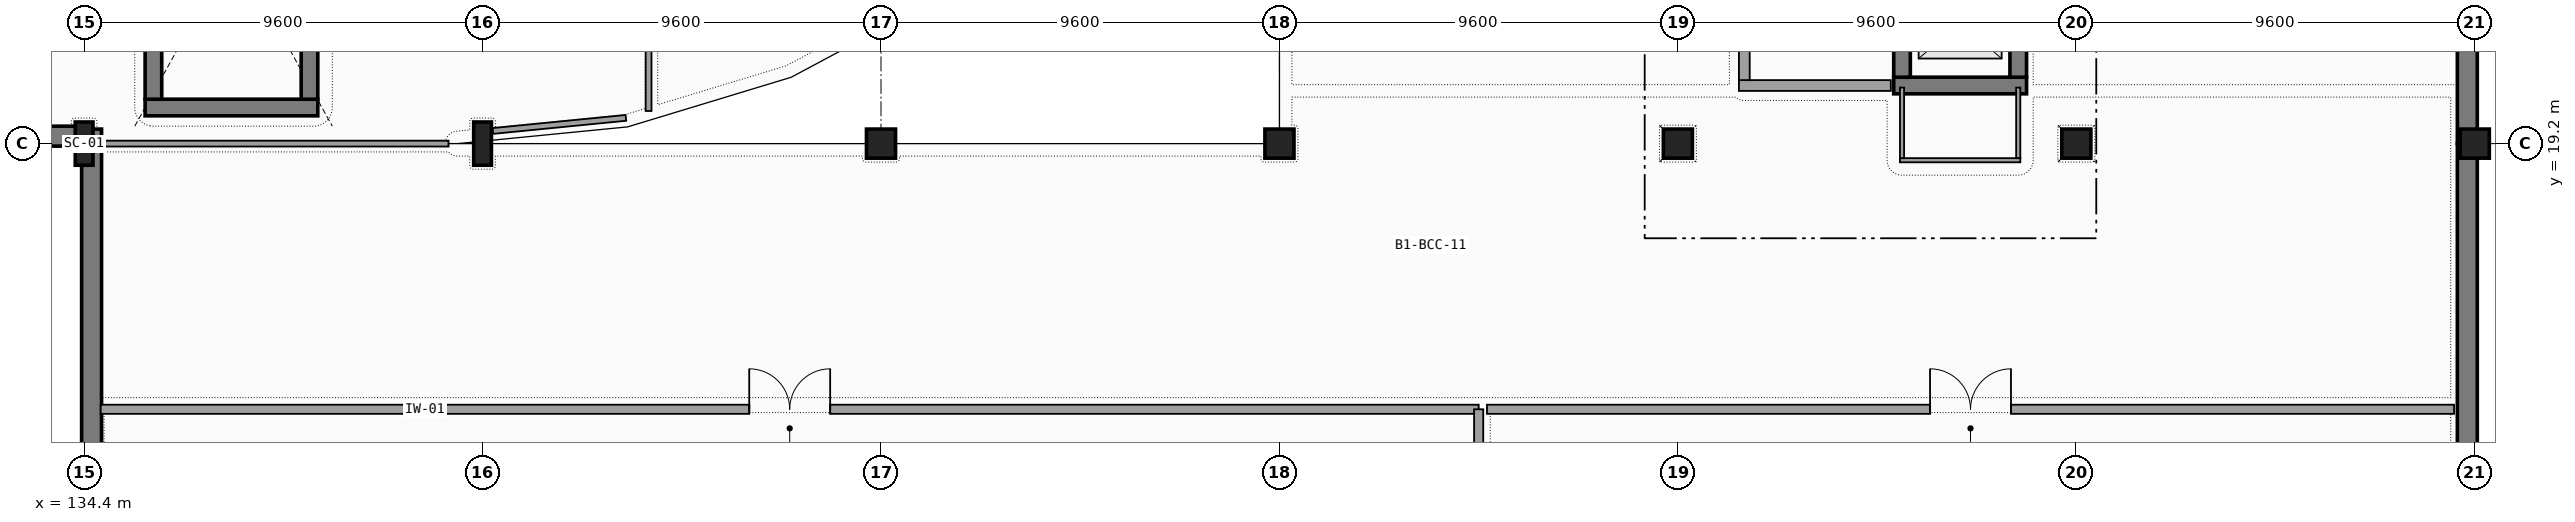
"""IFC4 building model, lengths in metres.
Left out: names, types, materials, properties, quantities, classifications, styles, units other than length and angle.
Written with IfcOpenShell. Run it as: python <this file> out.ifc"""

import sys

from ifc_helpers import new_model, si_unit, direction, frame, frame_2d, origin, origin_2d, place, context, subcontext, project, spatial, rectangle, i_section, extrude, element, fill, save


model = new_model("IFC4")
c1 = context("Model", 3, precision=1e-05, world=origin(), true_north=direction((0.0, 1.0)))
c2 = subcontext(c1, "Body", "Model", "MODEL_VIEW")
j1 = project(units=[si_unit("LENGTHUNIT", "METRE"), si_unit("PLANEANGLEUNIT", "RADIAN")], contexts=[c1])
p1 = place(None, origin())
s1 = spatial("IfcSite", under=j1, at=p1, CompositionType="ELEMENT")
p2 = place(p1, origin())
s2 = spatial("IfcBuilding", under=s1, at=p2, CompositionType="ELEMENT")
p3 = place(p2, frame((0.0, 0.0, -4.8)))
s3 = spatial("IfcBuildingStorey", under=s2, at=p3, CompositionType="ELEMENT", Elevation=-4.8)
for number, where, z_axis, x_axis in (
    (1, (134.4, 19.2, 0.0), (0.0, 0.0, 1.0), (1.0, 0.0, 0.0)),
    (2, (144.0, 19.2, 0.0), (0.0, 0.0, 1.0), (1.0, 0.0, 0.0)),
):
    element("IfcColumn", number, at=place(p3, frame(where, z_axis=z_axis, x_axis=x_axis)), inside=s3, PredefinedType="COLUMN", context=c2, shape_type="SweptSolid", body=[
        extrude(i_section(OverallWidth=0.427, OverallDepth=1.042, WebThickness=0.031, FlangeThickness=0.056, FilletRadius=0.031, at=origin_2d()), origin(), (0.0, 0.0, 1.0), 4.8),
    ])
for number, where, z_axis, x_axis in (
    (3, (153.6, 19.2, 0.0), (0.0, 0.0, 1.0), (1.0, 0.0, 0.0)),
    (4, (163.2, 19.2, 0.0), (0.0, 0.0, 1.0), (1.0, 0.0, 0.0)),
    (5, (172.8, 19.2, 0.0), (0.0, 0.0, 1.0), (1.0, 0.0, 0.0)),
    (6, (182.4, 19.2, 0.0), (0.0, 0.0, 1.0), (1.0, 0.0, 0.0)),
    (7, (192.0, 19.2, 0.0), (0.0, 0.0, 1.0), (1.0, 0.0, 0.0)),
):
    element("IfcColumn", number, at=place(p3, frame(where, z_axis=z_axis, x_axis=x_axis)), inside=s3, PredefinedType="COLUMN", context=c2, shape_type="SweptSolid", body=[
        extrude(rectangle(XDim=0.7, YDim=0.7, at=origin_2d()), origin(), (0.0, 0.0, 1.0), 4.8),
    ])
p4 = place(p3, frame((124.8, 19.38, 0.0), z_axis=(0.0, 0.0, 1.0), x_axis=(1.0, 0.0, 0.0)))
e8 = element("IfcWall", 8, at=p4, inside=s3, PredefinedType="USERDEFINED", context=c2, shape_type="SweptSolid", body=[
    extrude(rectangle(XDim=9.6, YDim=0.48, at=frame_2d((4.8, 0.0))), origin(), (0.0, 0.0, 1.0), 3.573),
])
p5 = place(p3, frame((134.58, 19.55, 0.0), z_axis=(0.0, 0.0, 1.0), x_axis=(0.0, -1.0, 0.0)))
e9 = element("IfcWall", 9, at=p5, inside=s3, PredefinedType="USERDEFINED", context=c2, shape_type="SweptSolid", body=[
    extrude(rectangle(XDim=9.95, YDim=0.48, at=frame_2d((4.975, 0.0))), origin(), (0.0, 0.0, 1.0), 3.573),
])
p6 = place(p3, frame((191.82, 9.6, 0.0), z_axis=(0.0, 0.0, 1.0), x_axis=(0.0, 1.0, 0.0)))
e10 = element("IfcWall", 10, at=p6, inside=s3, PredefinedType="USERDEFINED", context=c2, shape_type="SweptSolid", body=[
    extrude(rectangle(XDim=9.6, YDim=0.48, at=frame_2d((4.8, 0.0))), origin(), (0.0, 0.0, 1.0), 3.6),
])
p7 = place(p3, frame((191.82, 19.2, 0.0), z_axis=(0.0, 0.0, 1.0), x_axis=(0.0, 1.0, 0.0)))
e11 = element("IfcWall", 11, at=p7, inside=s3, PredefinedType="USERDEFINED", context=c2, shape_type="SweptSolid", body=[
    extrude(rectangle(XDim=9.6, YDim=0.48, at=frame_2d((4.8, 0.0))), origin(), (0.0, 0.0, 1.0), 3.573),
])
p8 = place(p3, frame((178.0, 20.6, 0.0), z_axis=(0.0, 0.0, 1.0), x_axis=(1.0, 0.0, 0.0)))
e12 = element("IfcWall", 12, at=p8, inside=s3, PredefinedType="SHEAR", context=c2, shape_type="SweptSolid", body=[
    extrude(rectangle(XDim=3.2, YDim=0.4, at=frame_2d((1.6, 0.0))), origin(), (0.0, 0.0, 1.0), 4.5),
])
p9 = place(p3, frame((178.2, 23.4, 0.0), z_axis=(0.0, 0.0, 1.0), x_axis=(0.0, -1.0, 0.0)))
e13 = element("IfcWall", 13, at=p9, inside=s3, PredefinedType="SHEAR", context=c2, shape_type="SweptSolid", body=[
    extrude(rectangle(XDim=2.6, YDim=0.4, at=frame_2d((1.3, 0.0))), origin(), (0.0, 0.0, 1.0), 4.5),
])
p10 = place(p9, frame((0.725, 0.0, 0.0), z_axis=(0.0, 0.0, 1.0), x_axis=(1.0, 0.0, 0.0)))
e14 = element("IfcOpeningElement", 14, at=p10, cuts=e13, PredefinedType="OPENING", context=c2, shape_type="SweptSolid", body=[
    extrude(rectangle(XDim=1.15, YDim=2.2, at=frame_2d((0.575, 1.1))), frame((0.0, 0.21, 0.0), z_axis=(0.0, -1.0, 0.0), x_axis=(1.0, 0.0, 0.0)), (0.0, 0.0, 1.0), 0.42),
])
p11 = place(p3, frame((181.0, 20.8, 0.0), z_axis=(0.0, 0.0, 1.0), x_axis=(0.0, 1.0, 0.0)))
e15 = element("IfcWall", 15, at=p11, inside=s3, PredefinedType="SHEAR", context=c2, shape_type="SweptSolid", body=[
    extrude(rectangle(XDim=2.6, YDim=0.4, at=frame_2d((1.3, 0.0))), origin(), (0.0, 0.0, 1.0), 4.5),
])
p12 = place(p3, frame((178.15, 18.8, 0.0), z_axis=(0.0, 0.0, 1.0), x_axis=(1.0, 0.0, 0.0)))
e16 = element("IfcWall", 16, at=p12, inside=s3, PredefinedType="PARTITIONING", context=c2, shape_type="SweptSolid", body=[
    extrude(rectangle(XDim=2.9, YDim=0.1, at=frame_2d((1.45, 0.0))), origin(), (0.0, 0.0, 1.0), 4.5),
])
for number, where, z_axis, x_axis in (
    (17, (178.2, 20.55, 0.0), (0.0, 0.0, 1.0), (0.0, -1.0, 0.0)),
    (18, (181.0, 18.85, 0.0), (0.0, 0.0, 1.0), (0.0, 1.0, 0.0)),
):
    element("IfcWall", number, at=place(p3, frame(where, z_axis=z_axis, x_axis=x_axis)), inside=s3, PredefinedType="PARTITIONING", context=c2, shape_type="SweptSolid", body=[
        extrude(rectangle(XDim=1.7, YDim=0.1, at=frame_2d((0.85, 0.0))), origin(), (0.0, 0.0, 1.0), 4.5),
    ])
p13 = place(p3, frame((174.27, 20.6, 0.0), z_axis=(0.0, 0.0, 1.0), x_axis=(1.0, 0.0, 0.0)))
e19 = element("IfcWall", 19, at=p13, inside=s3, PredefinedType="SOLIDWALL", context=c2, shape_type="SweptSolid", body=[
    extrude(rectangle(XDim=3.66, YDim=0.26, at=frame_2d((1.83, 0.0))), origin(), (0.0, 0.0, 1.0), 4.5),
])
p14 = place(p3, frame((174.4, 27.07, 0.0), z_axis=(0.0, 0.0, 1.0), x_axis=(0.0, -1.0, 0.0)))
e20 = element("IfcWall", 20, at=p14, inside=s3, PredefinedType="SOLIDWALL", context=c2, shape_type="SweptSolid", body=[
    extrude(rectangle(XDim=6.34, YDim=0.26, at=frame_2d((3.17, 0.0))), origin(), (0.0, 0.0, 1.0), 4.5),
])
p15 = place(p3, frame((135.87, 20.07, 0.0), z_axis=(0.0, 0.0, 1.0), x_axis=(1.0, 0.0, 0.0)))
e21 = element("IfcWall", 21, at=p15, inside=s3, PredefinedType="SHEAR", context=c2, shape_type="SweptSolid", body=[
    extrude(rectangle(XDim=4.16, YDim=0.4, at=frame_2d((2.08, 0.0))), origin(), (0.0, 0.0, 1.0), 4.5),
])
for number, where, z_axis, x_axis in (
    (22, (136.07, 27.53, 0.0), (0.0, 0.0, 1.0), (0.0, -1.0, 0.0)),
    (23, (139.83, 20.27, 0.0), (0.0, 0.0, 1.0), (0.0, 1.0, 0.0)),
):
    element("IfcWall", number, at=place(p3, frame(where, z_axis=z_axis, x_axis=x_axis)), inside=s3, PredefinedType="SHEAR", context=c2, shape_type="SweptSolid", body=[
        extrude(rectangle(XDim=7.26, YDim=0.4, at=frame_2d((3.63, 0.0))), origin(), (0.0, 0.0, 1.0), 4.5),
    ])
p16 = place(p3, frame((148.0, 28.38, 0.0), z_axis=(0.0, 0.0, 1.0), x_axis=(0.0, -1.0, 0.0)))
e24 = element("IfcWall", 24, at=p16, inside=s3, PredefinedType="PARTITIONING", context=c2, shape_type="SweptSolid", body=[
    extrude(rectangle(XDim=8.394, YDim=0.14, at=frame_2d((4.197, 0.0))), origin(), (0.0, 0.0, 1.0), 3.573),
])
p17 = place(p16, frame((3.697, 0.0, 0.0), z_axis=(0.0, 0.0, 1.0), x_axis=(1.0, 0.0, 0.0)))
e25 = element("IfcOpeningElement", 25, at=p17, cuts=e24, PredefinedType="OPENING", context=c2, shape_type="SweptSolid", body=[
    extrude(rectangle(XDim=1.0, YDim=2.2, at=frame_2d((0.5, 1.1))), frame((0.0, 0.08, 0.0), z_axis=(0.0, -1.0, 0.0), x_axis=(1.0, 0.0, 0.0)), (0.0, 0.0, 1.0), 0.16),
])
p18 = place(p3, frame((147.454, 19.82, 0.0), z_axis=(0.0, 0.0, 1.0), x_axis=(-0.99518541898, -0.098010110956, 0.0)))
e26 = element("IfcWall", 26, at=p18, inside=s3, PredefinedType="PARTITIONING", context=c2, shape_type="SweptSolid", body=[
    extrude(rectangle(XDim=3.221, YDim=0.14, at=frame_2d((1.61, 0.0))), origin(), (0.0, 0.0, 1.0), 3.573),
])
p19 = place(p3, frame((143.18, 19.2, 0.0), z_axis=(0.0, 0.0, 1.0), x_axis=(-1.0, 0.0, 0.0)))
e27 = element("IfcWall", 27, at=p19, inside=s3, PredefinedType="PARTITIONING", context=c2, shape_type="SweptSolid", body=[
    extrude(rectangle(XDim=8.531, YDim=0.14, at=frame_2d((4.266, 0.0))), origin(), (0.0, 0.0, 1.0), 3.573),
])
p20 = place(p3, frame((134.8, 12.8, 0.0), z_axis=(0.0, 0.0, 1.0), x_axis=(1.0, 0.0, 0.0)))
e28 = element("IfcWall", 28, at=p20, inside=s3, PredefinedType="PARTITIONING", context=c2, shape_type="SweptSolid", body=[
    extrude(rectangle(XDim=33.2, YDim=0.22, at=frame_2d((16.6, 0.0))), origin(), (0.0, 0.0, 1.0), 2.9),
])
p21 = place(p20, frame((15.625, 0.0, 0.0), z_axis=(0.0, 0.0, 1.0), x_axis=(1.0, 0.0, 0.0)))
e29 = element("IfcOpeningElement", 29, at=p21, cuts=e28, PredefinedType="OPENING", context=c2, shape_type="SweptSolid", body=[
    extrude(rectangle(XDim=1.95, YDim=2.35, at=frame_2d((0.975, 1.175))), frame((0.0, 0.12, 0.0), z_axis=(0.0, -1.0, 0.0), x_axis=(1.0, 0.0, 0.0)), (0.0, 0.0, 1.0), 0.24),
])
p22 = place(p3, frame((168.0, 12.8, 0.0), z_axis=(0.0, 0.0, 1.0), x_axis=(0.0, -1.0, 0.0)))
e30 = element("IfcWall", 30, at=p22, inside=s3, PredefinedType="PARTITIONING", context=c2, shape_type="SweptSolid", body=[
    extrude(rectangle(XDim=12.4, YDim=0.22, at=frame_2d((6.2, 0.0))), origin(), (0.0, 0.0, 1.0), 4.5),
])
p23 = place(p3, frame((168.2, 12.8, 0.0), z_axis=(0.0, 0.0, 1.0), x_axis=(1.0, 0.0, 0.0)))
e31 = element("IfcWall", 31, at=p23, inside=s3, PredefinedType="PARTITIONING", context=c2, shape_type="SweptSolid", body=[
    extrude(rectangle(XDim=23.3, YDim=0.22, at=frame_2d((11.65, 0.0))), origin(), (0.0, 0.0, 1.0), 3.7),
])
p24 = place(p23, frame((10.675, 0.0, 0.0), z_axis=(0.0, 0.0, 1.0), x_axis=(1.0, 0.0, 0.0)))
e32 = element("IfcOpeningElement", 32, at=p24, cuts=e31, PredefinedType="OPENING", context=c2, shape_type="SweptSolid", body=[
    extrude(rectangle(XDim=1.95, YDim=2.35, at=frame_2d((0.975, 1.175))), frame((0.0, 0.12, 0.0), z_axis=(0.0, -1.0, 0.0), x_axis=(1.0, 0.0, 0.0)), (0.0, 0.0, 1.0), 0.24),
])
p25 = place(p21, origin())
e33 = element("IfcDoor", 33, at=p25, inside=s3, OperationType="DOUBLE_DOOR_SINGLE_SWING", PredefinedType="DOOR", context=c2, shape_type="SweptSolid", body=[
    extrude(rectangle(XDim=1.95, YDim=2.35, at=frame_2d((0.975, 1.175))), frame((0.0, 0.025, 0.0), z_axis=(0.0, -1.0, 0.0), x_axis=(1.0, 0.0, 0.0)), (0.0, 0.0, 1.0), 0.05),
])
fill(e29, e33)
p26 = place(p24, origin())
e34 = element("IfcDoor", 34, at=p26, inside=s3, OperationType="DOUBLE_DOOR_SINGLE_SWING", PredefinedType="DOOR", context=c2, shape_type="SweptSolid", body=[
    extrude(rectangle(XDim=1.95, YDim=2.35, at=frame_2d((0.975, 1.175))), frame((0.0, 0.025, 0.0), z_axis=(0.0, -1.0, 0.0), x_axis=(1.0, 0.0, 0.0)), (0.0, 0.0, 1.0), 0.05),
])
fill(e32, e34)
save(model, sys.argv[1])
